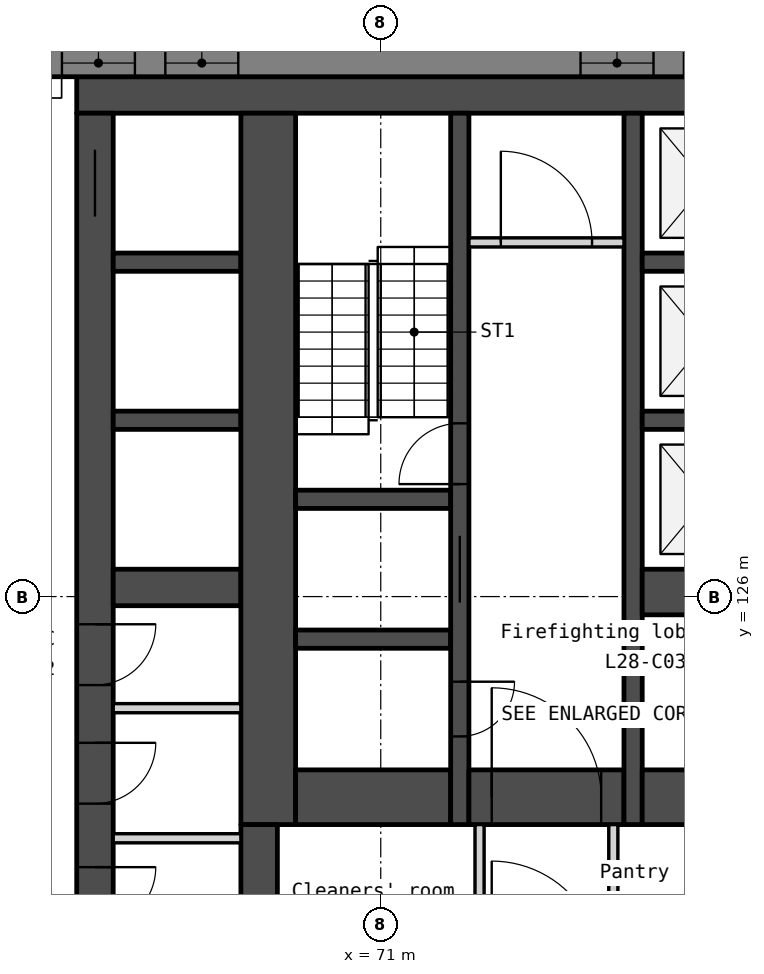
"""IFC4 building model, lengths in metres.
Left out: names, types, materials, properties, quantities, classifications, styles, units other than length and angle.
Written with IfcOpenShell. Run it as: python <this file> out.ifc"""

import sys

from ifc_helpers import new_model, si_unit, direction, frame, frame_2d, origin, place, context, subcontext, project, spatial, polyline, rectangle, outline, extrude, element, fill, save


model = new_model("IFC4")
c1 = context("Model", 3, precision=1e-05, world=origin(), true_north=direction((0.0, 1.0)))
c2 = subcontext(c1, "Body", "Model", "MODEL_VIEW")
j1 = project(units=[si_unit("LENGTHUNIT", "METRE"), si_unit("PLANEANGLEUNIT", "RADIAN")], contexts=[c1])
p1 = place(None, origin())
s1 = spatial("IfcSite", under=j1, at=p1, CompositionType="ELEMENT")
p2 = place(p1, origin())
s2 = spatial("IfcBuilding", under=s1, at=p2, CompositionType="ELEMENT")
p3 = place(p2, frame((0.0, 0.0, 113.3)))
s3 = spatial("IfcBuildingStorey", under=s2, at=p3, CompositionType="ELEMENT", Elevation=113.3)
p4 = place(p3, frame((66.0, 134.25, 0.0), z_axis=(0.0, 0.0, 1.0), x_axis=(1.0, 0.0, 0.0)))
e1 = element("IfcWall", 1, at=p4, inside=s3, PredefinedType="SOLIDWALL", context=c2, shape_type="SweptSolid", body=[
    extrude(rectangle(XDim=28.0, YDim=0.6, at=frame_2d((14.0, 0.0))), origin(), (0.0, 0.0, 1.0), 3.35),
])
p5 = place(p3, frame((66.3, 133.95, 0.0), z_axis=(0.0, 0.0, 1.0), x_axis=(0.0, -1.0, 0.0)))
e2 = element("IfcWall", 2, at=p5, inside=s3, PredefinedType="SOLIDWALL", context=c2, shape_type="SweptSolid", body=[
    extrude(rectangle(XDim=13.8, YDim=0.6, at=frame_2d((6.9, 0.0))), origin(), (0.0, 0.0, 1.0), 3.35),
])
p6 = place(p5, frame((0.6, 0.0, 0.0)))
e3 = element("IfcOpeningElement", 3, at=p6, cuts=e2, PredefinedType="OPENING", context=c2, shape_type="SweptSolid", body=[
    extrude(rectangle(XDim=1.1, YDim=2.1, at=frame_2d((0.55, 1.05))), frame((0.0, 0.31, 0.0), z_axis=(0.0, -1.0, 0.0), x_axis=(1.0, 0.0, 0.0)), (0.0, 0.0, 1.0), 0.62),
])
p7 = place(p5, frame((8.405, 0.0, 0.0)))
e4 = element("IfcOpeningElement", 4, at=p7, cuts=e2, PredefinedType="OPENING", context=c2, shape_type="SweptSolid", body=[
    extrude(rectangle(XDim=1.0, YDim=2.1, at=frame_2d((0.5, 1.05))), frame((0.0, 0.31, 0.0), z_axis=(0.0, -1.0, 0.0), x_axis=(1.0, 0.0, 0.0)), (0.0, 0.0, 1.0), 0.62),
])
p8 = place(p5, frame((10.355, 0.0, 0.0)))
e5 = element("IfcOpeningElement", 5, at=p8, cuts=e2, PredefinedType="OPENING", context=c2, shape_type="SweptSolid", body=[
    extrude(rectangle(XDim=1.0, YDim=2.1, at=frame_2d((0.5, 1.05))), frame((0.0, 0.31, 0.0), z_axis=(0.0, -1.0, 0.0), x_axis=(1.0, 0.0, 0.0)), (0.0, 0.0, 1.0), 0.62),
])
p9 = place(p5, frame((12.4, 0.0, 0.0)))
e6 = element("IfcOpeningElement", 6, at=p9, cuts=e2, PredefinedType="OPENING", context=c2, shape_type="SweptSolid", body=[
    extrude(rectangle(XDim=1.0, YDim=2.1, at=frame_2d((0.5, 1.05))), frame((0.0, 0.31, 0.0), z_axis=(0.0, -1.0, 0.0), x_axis=(1.0, 0.0, 0.0)), (0.0, 0.0, 1.0), 0.62),
])
for number, where, z_axis, x_axis in (
    (7, (66.6, 131.5, 0.0), (0.0, 0.0, 1.0), (1.0, 0.0, 0.0)),
    (8, (66.6, 128.9, 0.0), (0.0, 0.0, 1.0), (1.0, 0.0, 0.0)),
):
    element("IfcWall", number, at=place(p3, frame(where, z_axis=z_axis, x_axis=x_axis)), inside=s3, PredefinedType="SOLIDWALL", context=c2, shape_type="SweptSolid", body=[
        extrude(rectangle(XDim=2.1, YDim=0.3, at=frame_2d((1.05, 0.0))), origin(), (0.0, 0.0, 1.0), 3.35),
    ])
p10 = place(p3, frame((66.6, 126.15, 0.0), z_axis=(0.0, 0.0, 1.0), x_axis=(1.0, 0.0, 0.0)))
e9 = element("IfcWall", 9, at=p10, inside=s3, PredefinedType="SOLIDWALL", context=c2, shape_type="SweptSolid", body=[
    extrude(rectangle(XDim=2.1, YDim=0.6, at=frame_2d((1.05, 0.0))), origin(), (0.0, 0.0, 1.0), 3.35),
])
for number, where, z_axis, x_axis in (
    (10, (66.6, 124.165, 0.0), (0.0, 0.0, 1.0), (1.0, 0.0, 0.0)),
    (11, (66.6, 122.025, 0.0), (0.0, 0.0, 1.0), (1.0, 0.0, 0.0)),
):
    element("IfcWall", number, at=place(p3, frame(where, z_axis=z_axis, x_axis=x_axis)), inside=s3, PredefinedType="PARTITIONING", context=c2, shape_type="SweptSolid", body=[
        extrude(rectangle(XDim=2.1, YDim=0.15, at=frame_2d((1.05, 0.0))), origin(), (0.0, 0.0, 1.0), 3.35),
    ])
p11 = place(p3, frame((69.15, 133.95, 0.0), z_axis=(0.0, 0.0, 1.0), x_axis=(0.0, -1.0, 0.0)))
e12 = element("IfcWall", 12, at=p11, inside=s3, PredefinedType="SOLIDWALL", context=c2, shape_type="SweptSolid", body=[
    extrude(rectangle(XDim=11.7, YDim=0.9, at=frame_2d((5.85, 0.0))), origin(), (0.0, 0.0, 1.0), 3.35),
])
p12 = place(p3, frame((69.0, 122.25, 0.0), z_axis=(0.0, 0.0, 1.0), x_axis=(0.0, -1.0, 0.0)))
e13 = element("IfcWall", 13, at=p12, inside=s3, PredefinedType="SOLIDWALL", context=c2, shape_type="SweptSolid", body=[
    extrude(rectangle(XDim=2.1, YDim=0.6, at=frame_2d((1.05, 0.0))), origin(), (0.0, 0.0, 1.0), 3.35),
])
for number, where, z_axis, x_axis in (
    (14, (69.6, 127.6, 0.0), (0.0, 0.0, 1.0), (1.0, 0.0, 0.0)),
    (15, (69.6, 125.3, 0.0), (0.0, 0.0, 1.0), (1.0, 0.0, 0.0)),
):
    element("IfcWall", number, at=place(p3, frame(where, z_axis=z_axis, x_axis=x_axis)), inside=s3, PredefinedType="SOLIDWALL", context=c2, shape_type="SweptSolid", body=[
        extrude(rectangle(XDim=2.55, YDim=0.3, at=frame_2d((1.275, 0.0))), origin(), (0.0, 0.0, 1.0), 3.35),
    ])
p13 = place(p3, frame((69.6, 122.7, 0.0), z_axis=(0.0, 0.0, 1.0), x_axis=(1.0, 0.0, 0.0)))
e16 = element("IfcWall", 16, at=p13, inside=s3, PredefinedType="SOLIDWALL", context=c2, shape_type="SweptSolid", body=[
    extrude(rectangle(XDim=2.55, YDim=0.9, at=frame_2d((1.275, 0.0))), origin(), (0.0, 0.0, 1.0), 3.35),
])
p14 = place(p3, frame((72.3, 133.95, 0.0), z_axis=(0.0, 0.0, 1.0), x_axis=(0.0, -1.0, 0.0)))
e17 = element("IfcWall", 17, at=p14, inside=s3, PredefinedType="SOLIDWALL", context=c2, shape_type="SweptSolid", body=[
    extrude(rectangle(XDim=11.7, YDim=0.3, at=frame_2d((5.85, 0.0))), origin(), (0.0, 0.0, 1.0), 3.35),
])
p15 = place(p14, frame((6.95, 0.0, 0.0)))
e18 = element("IfcOpeningElement", 18, at=p15, cuts=e17, PredefinedType="OPENING", context=c2, shape_type="SweptSolid", body=[
    extrude(rectangle(XDim=1.1, YDim=2.1, at=frame_2d((0.55, 1.05))), frame((0.0, 0.16, 0.0), z_axis=(0.0, -1.0, 0.0), x_axis=(1.0, 0.0, 0.0)), (0.0, 0.0, 1.0), 0.32),
])
p16 = place(p14, frame((9.35, 0.0, 0.0)))
e19 = element("IfcOpeningElement", 19, at=p16, cuts=e17, PredefinedType="OPENING", context=c2, shape_type="SweptSolid", body=[
    extrude(rectangle(XDim=0.9, YDim=2.1, at=frame_2d((0.45, 1.05))), frame((0.0, 0.16, 0.0), z_axis=(0.0, -1.0, 0.0), x_axis=(1.0, 0.0, 0.0)), (0.0, 0.0, 1.0), 0.32),
])
p17 = place(p14, frame((5.1, 0.0, 0.0)))
e20 = element("IfcOpeningElement", 20, at=p17, cuts=e17, PredefinedType="OPENING", context=c2, shape_type="SweptSolid", body=[
    extrude(rectangle(XDim=1.0, YDim=2.1, at=frame_2d((0.5, 1.05))), frame((0.0, 0.16, 0.0), z_axis=(0.0, -1.0, 0.0), x_axis=(1.0, 0.0, 0.0)), (0.0, 0.0, 1.0), 0.32),
])
p18 = place(p3, frame((72.45, 131.825, 0.0), z_axis=(0.0, 0.0, 1.0), x_axis=(1.0, 0.0, 0.0)))
e21 = element("IfcWall", 21, at=p18, inside=s3, PredefinedType="PARTITIONING", context=c2, shape_type="SweptSolid", body=[
    extrude(rectangle(XDim=2.55, YDim=0.15, at=frame_2d((1.275, 0.0))), origin(), (0.0, 0.0, 1.0), 3.35),
])
p19 = place(p18, frame((0.525, 0.0, 0.0)))
e22 = element("IfcOpeningElement", 22, at=p19, cuts=e21, PredefinedType="OPENING", context=c2, shape_type="SweptSolid", body=[
    extrude(rectangle(XDim=1.5, YDim=2.1, at=frame_2d((0.75, 1.05))), frame((0.0, 0.085, 0.0), z_axis=(0.0, -1.0, 0.0), x_axis=(1.0, 0.0, 0.0)), (0.0, 0.0, 1.0), 0.17),
])
p20 = place(p3, frame((72.45, 122.7, 0.0), z_axis=(0.0, 0.0, 1.0), x_axis=(1.0, 0.0, 0.0)))
e23 = element("IfcWall", 23, at=p20, inside=s3, PredefinedType="SOLIDWALL", context=c2, shape_type="SweptSolid", body=[
    extrude(rectangle(XDim=2.55, YDim=0.9, at=frame_2d((1.275, 0.0))), origin(), (0.0, 0.0, 1.0), 3.35),
])
p21 = place(p20, frame((0.375, 0.0, 0.0)))
e24 = element("IfcOpeningElement", 24, at=p21, cuts=e23, PredefinedType="OPENING", context=c2, shape_type="SweptSolid", body=[
    extrude(rectangle(XDim=1.8, YDim=2.1, at=frame_2d((0.9, 1.05))), frame((0.0, 0.46, 0.0), z_axis=(0.0, -1.0, 0.0), x_axis=(1.0, 0.0, 0.0)), (0.0, 0.0, 1.0), 0.92),
])
for number, where, z_axis, x_axis in (
    (25, (72.625, 122.25, 0.0), (0.0, 0.0, 1.0), (0.0, -1.0, 0.0)),
    (26, (74.825, 122.25, 0.0), (0.0, 0.0, 1.0), (0.0, -1.0, 0.0)),
):
    element("IfcWall", number, at=place(p3, frame(where, z_axis=z_axis, x_axis=x_axis)), inside=s3, PredefinedType="PARTITIONING", context=c2, shape_type="SweptSolid", body=[
        extrude(rectangle(XDim=2.1, YDim=0.15, at=frame_2d((1.05, 0.0))), origin(), (0.0, 0.0, 1.0), 3.35),
    ])
p22 = place(p3, frame((75.15, 133.95, 0.0), z_axis=(0.0, 0.0, 1.0), x_axis=(0.0, -1.0, 0.0)))
e27 = element("IfcWall", 27, at=p22, inside=s3, PredefinedType="SOLIDWALL", context=c2, shape_type="SweptSolid", body=[
    extrude(rectangle(XDim=11.7, YDim=0.3, at=frame_2d((5.85, 0.0))), origin(), (0.0, 0.0, 1.0), 3.35),
])
for number, where, z_axis, x_axis in (
    (28, (75.3, 131.5, 0.0), (0.0, 0.0, 1.0), (1.0, 0.0, 0.0)),
    (29, (75.3, 128.9, 0.0), (0.0, 0.0, 1.0), (1.0, 0.0, 0.0)),
):
    element("IfcWall", number, at=place(p3, frame(where, z_axis=z_axis, x_axis=x_axis)), inside=s3, PredefinedType="SOLIDWALL", context=c2, shape_type="SweptSolid", body=[
        extrude(rectangle(XDim=2.1, YDim=0.3, at=frame_2d((1.05, 0.0))), origin(), (0.0, 0.0, 1.0), 3.35),
    ])
p23 = place(p3, frame((75.3, 126.075, 0.0), z_axis=(0.0, 0.0, 1.0), x_axis=(1.0, 0.0, 0.0)))
e30 = element("IfcWall", 30, at=p23, inside=s3, PredefinedType="SOLIDWALL", context=c2, shape_type="SweptSolid", body=[
    extrude(rectangle(XDim=2.1, YDim=0.75, at=frame_2d((1.05, 0.0))), origin(), (0.0, 0.0, 1.0), 3.35),
])
p24 = place(p3, frame((75.3, 122.7, 0.0), z_axis=(0.0, 0.0, 1.0), x_axis=(1.0, 0.0, 0.0)))
e31 = element("IfcWall", 31, at=p24, inside=s3, PredefinedType="SOLIDWALL", context=c2, shape_type="SweptSolid", body=[
    extrude(rectangle(XDim=6.2, YDim=0.9, at=frame_2d((3.1, 0.0))), origin(), (0.0, 0.0, 1.0), 3.35),
])
p25 = place(p3, frame((101.322, 134.775, -0.15), z_axis=(0.0, 0.0, 1.0), x_axis=(-1.0, 0.0, 0.0)))
e32 = element("IfcWall", 32, at=p25, inside=s3, PredefinedType="SOLIDWALL", context=c2, shape_type="SweptSolid", body=[
    extrude(outline(polyline([(42.643, 0.0), (42.643, 3.5), (0.0, 3.5), (0.0, 0.0), (42.643, 0.0)])), frame((0.0, 0.225, 0.0), z_axis=(0.0, -1.0, 0.0), x_axis=(1.0, 0.0, 0.0)), (0.0, 0.0, 1.0), 0.45),
])
p26 = place(p25, frame((7.079, 0.0, 1.05)))
e33 = element("IfcOpeningElement", 33, at=p26, cuts=e32, PredefinedType="OPENING", context=c2, shape_type="SweptSolid", body=[
    extrude(rectangle(XDim=1.2, YDim=1.5, at=frame_2d((0.6, 0.75))), frame((0.0, 0.235, 0.0), z_axis=(0.0, -1.0, 0.0), x_axis=(1.0, 0.0, 0.0)), (0.0, 0.0, 1.0), 0.47),
])
p27 = place(p25, frame((8.779, 0.0, 1.05)))
e34 = element("IfcOpeningElement", 34, at=p27, cuts=e32, PredefinedType="OPENING", context=c2, shape_type="SweptSolid", body=[
    extrude(rectangle(XDim=1.2, YDim=1.5, at=frame_2d((0.6, 0.75))), frame((0.0, 0.235, 0.0), z_axis=(0.0, -1.0, 0.0), x_axis=(1.0, 0.0, 0.0)), (0.0, 0.0, 1.0), 0.47),
])
p28 = place(p25, frame((15.607, 0.0, 1.05)))
e35 = element("IfcOpeningElement", 35, at=p28, cuts=e32, PredefinedType="OPENING", context=c2, shape_type="SweptSolid", body=[
    extrude(rectangle(XDim=1.2, YDim=1.5, at=frame_2d((0.6, 0.75))), frame((0.0, 0.235, 0.0), z_axis=(0.0, -1.0, 0.0), x_axis=(1.0, 0.0, 0.0)), (0.0, 0.0, 1.0), 0.47),
])
p29 = place(p25, frame((17.307, 0.0, 1.05)))
e36 = element("IfcOpeningElement", 36, at=p29, cuts=e32, PredefinedType="OPENING", context=c2, shape_type="SweptSolid", body=[
    extrude(rectangle(XDim=1.2, YDim=1.5, at=frame_2d((0.6, 0.75))), frame((0.0, 0.235, 0.0), z_axis=(0.0, -1.0, 0.0), x_axis=(1.0, 0.0, 0.0)), (0.0, 0.0, 1.0), 0.47),
])
p30 = place(p25, frame((24.136, 0.0, 1.05)))
e37 = element("IfcOpeningElement", 37, at=p30, cuts=e32, PredefinedType="OPENING", context=c2, shape_type="SweptSolid", body=[
    extrude(rectangle(XDim=1.2, YDim=1.5, at=frame_2d((0.6, 0.75))), frame((0.0, 0.235, 0.0), z_axis=(0.0, -1.0, 0.0), x_axis=(1.0, 0.0, 0.0)), (0.0, 0.0, 1.0), 0.47),
])
p31 = place(p25, frame((25.836, 0.0, 1.05)))
e38 = element("IfcOpeningElement", 38, at=p31, cuts=e32, PredefinedType="OPENING", context=c2, shape_type="SweptSolid", body=[
    extrude(rectangle(XDim=1.2, YDim=1.5, at=frame_2d((0.6, 0.75))), frame((0.0, 0.235, 0.0), z_axis=(0.0, -1.0, 0.0), x_axis=(1.0, 0.0, 0.0)), (0.0, 0.0, 1.0), 0.47),
])
p32 = place(p25, frame((32.665, 0.0, 1.05)))
e39 = element("IfcOpeningElement", 39, at=p32, cuts=e32, PredefinedType="OPENING", context=c2, shape_type="SweptSolid", body=[
    extrude(rectangle(XDim=1.2, YDim=1.5, at=frame_2d((0.6, 0.75))), frame((0.0, 0.235, 0.0), z_axis=(0.0, -1.0, 0.0), x_axis=(1.0, 0.0, 0.0)), (0.0, 0.0, 1.0), 0.47),
])
p33 = place(p25, frame((34.365, 0.0, 1.05)))
e40 = element("IfcOpeningElement", 40, at=p33, cuts=e32, PredefinedType="OPENING", context=c2, shape_type="SweptSolid", body=[
    extrude(rectangle(XDim=1.2, YDim=1.5, at=frame_2d((0.6, 0.75))), frame((0.0, 0.235, 0.0), z_axis=(0.0, -1.0, 0.0), x_axis=(1.0, 0.0, 0.0)), (0.0, 0.0, 1.0), 0.47),
])
p34 = place(p3, frame((56.073, 130.263, -0.15), z_axis=(0.0, 0.0, 1.0), x_axis=(0.500000478905, -0.866025127289, 0.0)))
e41 = element("IfcWall", 41, at=p34, inside=s3, PredefinedType="SOLIDWALL", context=c2, shape_type="SweptSolid", body=[
    extrude(outline(polyline([(42.643, 0.0), (42.643, 3.5), (0.0, 3.5), (0.0, 0.0), (42.643, 0.0)])), frame((0.0, 0.225, 0.0), z_axis=(0.0, -1.0, 0.0), x_axis=(1.0, 0.0, 0.0)), (0.0, 0.0, 1.0), 0.45),
])
p35 = place(p34, frame((7.079, 0.0, 1.05)))
e42 = element("IfcOpeningElement", 42, at=p35, cuts=e41, PredefinedType="OPENING", context=c2, shape_type="SweptSolid", body=[
    extrude(rectangle(XDim=1.2, YDim=1.5, at=frame_2d((0.6, 0.75))), frame((0.0, 0.235, 0.0), z_axis=(0.0, -1.0, 0.0), x_axis=(1.0, 0.0, 0.0)), (0.0, 0.0, 1.0), 0.47),
])
p36 = place(p34, frame((8.779, 0.0, 1.05)))
e43 = element("IfcOpeningElement", 43, at=p36, cuts=e41, PredefinedType="OPENING", context=c2, shape_type="SweptSolid", body=[
    extrude(rectangle(XDim=1.2, YDim=1.5, at=frame_2d((0.6, 0.75))), frame((0.0, 0.235, 0.0), z_axis=(0.0, -1.0, 0.0), x_axis=(1.0, 0.0, 0.0)), (0.0, 0.0, 1.0), 0.47),
])
p37 = place(p34, frame((15.607, 0.0, 1.05)))
e44 = element("IfcOpeningElement", 44, at=p37, cuts=e41, PredefinedType="OPENING", context=c2, shape_type="SweptSolid", body=[
    extrude(rectangle(XDim=1.2, YDim=1.5, at=frame_2d((0.6, 0.75))), frame((0.0, 0.235, 0.0), z_axis=(0.0, -1.0, 0.0), x_axis=(1.0, 0.0, 0.0)), (0.0, 0.0, 1.0), 0.47),
])
p38 = place(p34, frame((17.307, 0.0, 1.05)))
e45 = element("IfcOpeningElement", 45, at=p38, cuts=e41, PredefinedType="OPENING", context=c2, shape_type="SweptSolid", body=[
    extrude(rectangle(XDim=1.2, YDim=1.5, at=frame_2d((0.6, 0.75))), frame((0.0, 0.235, 0.0), z_axis=(0.0, -1.0, 0.0), x_axis=(1.0, 0.0, 0.0)), (0.0, 0.0, 1.0), 0.47),
])
p39 = place(p34, frame((24.136, 0.0, 1.05)))
e46 = element("IfcOpeningElement", 46, at=p39, cuts=e41, PredefinedType="OPENING", context=c2, shape_type="SweptSolid", body=[
    extrude(rectangle(XDim=1.2, YDim=1.5, at=frame_2d((0.6, 0.75))), frame((0.0, 0.235, 0.0), z_axis=(0.0, -1.0, 0.0), x_axis=(1.0, 0.0, 0.0)), (0.0, 0.0, 1.0), 0.47),
])
p40 = place(p34, frame((25.836, 0.0, 1.05)))
e47 = element("IfcOpeningElement", 47, at=p40, cuts=e41, PredefinedType="OPENING", context=c2, shape_type="SweptSolid", body=[
    extrude(rectangle(XDim=1.2, YDim=1.5, at=frame_2d((0.6, 0.75))), frame((0.0, 0.235, 0.0), z_axis=(0.0, -1.0, 0.0), x_axis=(1.0, 0.0, 0.0)), (0.0, 0.0, 1.0), 0.47),
])
p41 = place(p34, frame((32.665, 0.0, 1.05)))
e48 = element("IfcOpeningElement", 48, at=p41, cuts=e41, PredefinedType="OPENING", context=c2, shape_type="SweptSolid", body=[
    extrude(rectangle(XDim=1.2, YDim=1.5, at=frame_2d((0.6, 0.75))), frame((0.0, 0.235, 0.0), z_axis=(0.0, -1.0, 0.0), x_axis=(1.0, 0.0, 0.0)), (0.0, 0.0, 1.0), 0.47),
])
p42 = place(p34, frame((34.365, 0.0, 1.05)))
e49 = element("IfcOpeningElement", 49, at=p42, cuts=e41, PredefinedType="OPENING", context=c2, shape_type="SweptSolid", body=[
    extrude(rectangle(XDim=1.2, YDim=1.5, at=frame_2d((0.6, 0.75))), frame((0.0, 0.235, 0.0), z_axis=(0.0, -1.0, 0.0), x_axis=(1.0, 0.0, 0.0)), (0.0, 0.0, 1.0), 0.47),
])
p43 = place(p6, origin())
e50 = element("IfcDoor", 50, at=p43, inside=s3, OperationType="SLIDING_TO_LEFT", PredefinedType="DOOR", context=c2, shape_type="SweptSolid", body=[
    extrude(rectangle(XDim=1.1, YDim=2.1, at=frame_2d((0.55, 1.05))), frame((0.0, 0.025, 0.0), z_axis=(0.0, -1.0, 0.0), x_axis=(1.0, 0.0, 0.0)), (0.0, 0.0, 1.0), 0.05),
])
fill(e3, e50)
p44 = place(p15, origin())
e51 = element("IfcDoor", 51, at=p44, inside=s3, OperationType="SLIDING_TO_LEFT", PredefinedType="DOOR", context=c2, shape_type="SweptSolid", body=[
    extrude(rectangle(XDim=1.1, YDim=2.1, at=frame_2d((0.55, 1.05))), frame((0.0, 0.025, 0.0), z_axis=(0.0, -1.0, 0.0), x_axis=(1.0, 0.0, 0.0)), (0.0, 0.0, 1.0), 0.05),
])
fill(e18, e51)
p45 = place(p21, origin())
e52 = element("IfcDoor", 52, at=p45, inside=s3, OperationType="DOUBLE_DOOR_DOUBLE_SWING", PredefinedType="DOOR", context=c2, shape_type="SweptSolid", body=[
    extrude(rectangle(XDim=1.8, YDim=2.1, at=frame_2d((0.9, 1.05))), frame((0.0, 0.025, 0.0), z_axis=(0.0, -1.0, 0.0), x_axis=(1.0, 0.0, 0.0)), (0.0, 0.0, 1.0), 0.05),
])
fill(e24, e52)
p46 = place(p19, origin())
e53 = element("IfcDoor", 53, at=p46, inside=s3, OperationType="DOUBLE_DOOR_DOUBLE_SWING", PredefinedType="DOOR", context=c2, shape_type="SweptSolid", body=[
    extrude(rectangle(XDim=1.5, YDim=2.1, at=frame_2d((0.75, 1.05))), frame((0.0, 0.025, 0.0), z_axis=(0.0, -1.0, 0.0), x_axis=(1.0, 0.0, 0.0)), (0.0, 0.0, 1.0), 0.05),
])
fill(e22, e53)
p47 = place(p16, origin())
e54 = element("IfcDoor", 54, at=p47, inside=s3, OperationType="SINGLE_SWING_LEFT", PredefinedType="DOOR", context=c2, shape_type="SweptSolid", body=[
    extrude(rectangle(XDim=0.9, YDim=2.1, at=frame_2d((0.45, 1.05))), frame((0.0, 0.025, 0.0), z_axis=(0.0, -1.0, 0.0), x_axis=(1.0, 0.0, 0.0)), (0.0, 0.0, 1.0), 0.05),
])
fill(e19, e54)
p48 = place(p17, origin())
e55 = element("IfcDoor", 55, at=p48, inside=s3, OperationType="SINGLE_SWING_RIGHT", PredefinedType="DOOR", context=c2, shape_type="SweptSolid", body=[
    extrude(rectangle(XDim=1.0, YDim=2.1, at=frame_2d((0.5, 1.05))), frame((0.0, 0.025, 0.0), z_axis=(0.0, -1.0, 0.0), x_axis=(1.0, 0.0, 0.0)), (0.0, 0.0, 1.0), 0.05),
])
fill(e20, e55)
p49 = place(p7, origin())
e56 = element("IfcDoor", 56, at=p49, inside=s3, OperationType="SINGLE_SWING_LEFT", PredefinedType="DOOR", context=c2, shape_type="SweptSolid", body=[
    extrude(rectangle(XDim=1.0, YDim=2.1, at=frame_2d((0.5, 1.05))), frame((0.0, 0.025, 0.0), z_axis=(0.0, -1.0, 0.0), x_axis=(1.0, 0.0, 0.0)), (0.0, 0.0, 1.0), 0.05),
])
fill(e4, e56)
p50 = place(p8, origin())
e57 = element("IfcDoor", 57, at=p50, inside=s3, OperationType="SINGLE_SWING_LEFT", PredefinedType="DOOR", context=c2, shape_type="SweptSolid", body=[
    extrude(rectangle(XDim=1.0, YDim=2.1, at=frame_2d((0.5, 1.05))), frame((0.0, 0.025, 0.0), z_axis=(0.0, -1.0, 0.0), x_axis=(1.0, 0.0, 0.0)), (0.0, 0.0, 1.0), 0.05),
])
fill(e5, e57)
p51 = place(p9, origin())
e58 = element("IfcDoor", 58, at=p51, inside=s3, OperationType="SINGLE_SWING_LEFT", PredefinedType="DOOR", context=c2, shape_type="SweptSolid", body=[
    extrude(rectangle(XDim=1.0, YDim=2.1, at=frame_2d((0.5, 1.05))), frame((0.0, 0.025, 0.0), z_axis=(0.0, -1.0, 0.0), x_axis=(1.0, 0.0, 0.0)), (0.0, 0.0, 1.0), 0.05),
])
fill(e6, e58)
p52 = place(p30, origin())
e59 = element("IfcWindow", 59, at=p52, inside=s3, PartitioningType="SINGLE_PANEL", PredefinedType="WINDOW", context=c2, shape_type="SweptSolid", body=[
    extrude(rectangle(XDim=1.2, YDim=1.5, at=frame_2d((0.6, 0.75))), frame((0.0, 0.03, 0.0), z_axis=(0.0, -1.0, 0.0), x_axis=(1.0, 0.0, 0.0)), (0.0, 0.0, 1.0), 0.06),
])
fill(e37, e59)
p53 = place(p31, origin())
e60 = element("IfcWindow", 60, at=p53, inside=s3, PartitioningType="SINGLE_PANEL", PredefinedType="WINDOW", context=c2, shape_type="SweptSolid", body=[
    extrude(rectangle(XDim=1.2, YDim=1.5, at=frame_2d((0.6, 0.75))), frame((0.0, 0.03, 0.0), z_axis=(0.0, -1.0, 0.0), x_axis=(1.0, 0.0, 0.0)), (0.0, 0.0, 1.0), 0.06),
])
fill(e38, e60)
p54 = place(p32, origin())
e61 = element("IfcWindow", 61, at=p54, inside=s3, PartitioningType="SINGLE_PANEL", PredefinedType="WINDOW", context=c2, shape_type="SweptSolid", body=[
    extrude(rectangle(XDim=1.2, YDim=1.5, at=frame_2d((0.6, 0.75))), frame((0.0, 0.03, 0.0), z_axis=(0.0, -1.0, 0.0), x_axis=(1.0, 0.0, 0.0)), (0.0, 0.0, 1.0), 0.06),
])
fill(e39, e61)
p55 = place(p33, origin())
e62 = element("IfcWindow", 62, at=p55, inside=s3, PartitioningType="SINGLE_PANEL", PredefinedType="WINDOW", context=c2, shape_type="SweptSolid", body=[
    extrude(rectangle(XDim=1.2, YDim=1.5, at=frame_2d((0.6, 0.75))), frame((0.0, 0.03, 0.0), z_axis=(0.0, -1.0, 0.0), x_axis=(1.0, 0.0, 0.0)), (0.0, 0.0, 1.0), 0.06),
])
fill(e40, e62)
save(model, sys.argv[1])
